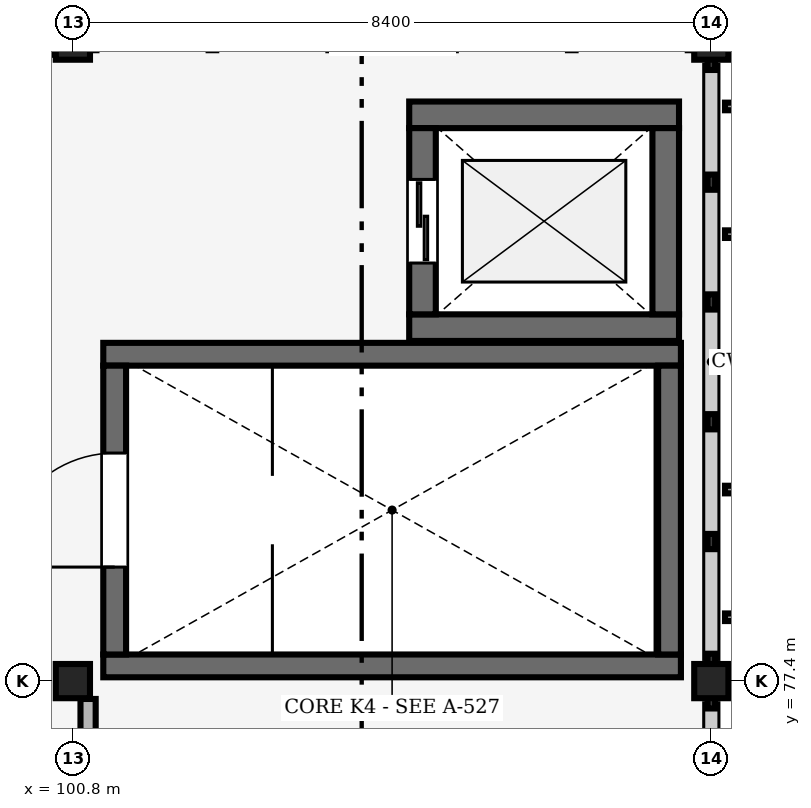
"""IFC4 building model, lengths in metres.
Left out: names, types, materials, properties, quantities, classifications, styles, units other than length and angle.
Written with IfcOpenShell. Run it as: python <this file> out.ifc"""

import sys

from ifc_helpers import new_model, si_unit, direction, frame, frame_2d, origin, origin_2d, place, context, subcontext, project, spatial, rectangle, extrude, element, fill, save


model = new_model("IFC4")
c1 = context("Model", 3, precision=1e-05, world=origin(), true_north=direction((0.0, 1.0)))
c2 = subcontext(c1, "Body", "Model", "MODEL_VIEW")
j1 = project(units=[si_unit("LENGTHUNIT", "METRE"), si_unit("PLANEANGLEUNIT", "RADIAN")], contexts=[c1])
p1 = place(None, origin())
s1 = spatial("IfcSite", under=j1, at=p1, CompositionType="ELEMENT")
p2 = place(p1, origin())
s2 = spatial("IfcBuilding", under=s1, at=p2, CompositionType="ELEMENT")
p3 = place(p2, frame((0.0, 0.0, 17.4)))
s3 = spatial("IfcBuildingStorey", under=s2, at=p3, CompositionType="ELEMENT", Elevation=17.4)
for number, where, z_axis, x_axis in (
    (1, (100.8, 77.4, 0.0), (0.0, 0.0, 1.0), (1.0, 0.0, 0.0)),
    (2, (100.8, 85.8, 0.0), (0.0, 0.0, 1.0), (1.0, 0.0, 0.0)),
    (3, (109.2, 77.4, 0.0), (0.0, 0.0, 1.0), (1.0, 0.0, 0.0)),
    (4, (109.2, 85.8, 0.0), (0.0, 0.0, 1.0), (1.0, 0.0, 0.0)),
):
    element("IfcColumn", number, at=place(p3, frame(where, z_axis=z_axis, x_axis=x_axis)), inside=s3, PredefinedType="COLUMN", context=c2, shape_type="SweptSolid", body=[
        extrude(rectangle(XDim=0.45, YDim=0.45, at=origin_2d()), origin(), (0.0, 0.0, 1.0), 4.2),
    ])
p4 = place(p3, frame((92.6, 85.8, 0.0), z_axis=(0.0, 0.0, 1.0), x_axis=(1.0, 0.0, 0.0)))
e5 = element("IfcWall", 5, at=p4, inside=s3, PredefinedType="SOLIDWALL", context=c2, shape_type="SweptSolid", body=[
    extrude(rectangle(XDim=8.0, YDim=0.32, at=frame_2d((4.0, 0.0))), origin(), (0.0, 0.0, 1.0), 3.48),
])
p5 = place(p4, frame((0.45, 0.0, 0.9)))
e6 = element("IfcOpeningElement", 6, at=p5, cuts=e5, PredefinedType="OPENING", context=c2, shape_type="SweptSolid", body=[
    extrude(rectangle(XDim=1.2, YDim=1.8, at=frame_2d((0.6, 0.9))), frame((0.0, 0.17, 0.0), z_axis=(0.0, -1.0, 0.0), x_axis=(1.0, 0.0, 0.0)), (0.0, 0.0, 1.0), 0.34),
])
p6 = place(p4, frame((6.07, 0.0, 0.9)))
e7 = element("IfcOpeningElement", 7, at=p6, cuts=e5, PredefinedType="OPENING", context=c2, shape_type="SweptSolid", body=[
    extrude(rectangle(XDim=1.68, YDim=2.4, at=frame_2d((0.84, 1.2))), frame((0.0, 0.17, 0.0), z_axis=(0.0, -1.0, 0.0), x_axis=(1.0, 0.0, 0.0)), (0.0, 0.0, 1.0), 0.34),
])
for number, where, z_axis, x_axis in (
    (8, (101.2, 77.6, 0.0), (0.0, 0.0, 1.0), (1.0, 0.0, 0.0)),
    (9, (101.2, 81.7, 0.0), (0.0, 0.0, 1.0), (1.0, 0.0, 0.0)),
):
    element("IfcWall", number, at=place(p3, frame(where, z_axis=z_axis, x_axis=x_axis)), inside=s3, PredefinedType="SHEAR", context=c2, shape_type="SweptSolid", body=[
        extrude(rectangle(XDim=7.6, YDim=0.3, at=frame_2d((3.8, 0.0))), origin(), (0.0, 0.0, 1.0), 4.025),
    ])
p7 = place(p3, frame((101.35, 77.75, 0.0), z_axis=(0.0, 0.0, 1.0), x_axis=(0.0, 1.0, 0.0)))
e10 = element("IfcWall", 10, at=p7, inside=s3, PredefinedType="SHEAR", context=c2, shape_type="SweptSolid", body=[
    extrude(rectangle(XDim=3.8, YDim=0.3, at=frame_2d((1.9, 0.0))), origin(), (0.0, 0.0, 1.0), 4.025),
])
p8 = place(p7, frame((1.15, 0.0, 0.0)))
e11 = element("IfcOpeningElement", 11, at=p8, cuts=e10, PredefinedType="OPENING", context=c2, shape_type="SweptSolid", body=[
    extrude(rectangle(XDim=1.5, YDim=2.2, at=frame_2d((0.75, 1.1))), frame((0.0, 0.16, 0.0), z_axis=(0.0, -1.0, 0.0), x_axis=(1.0, 0.0, 0.0)), (0.0, 0.0, 1.0), 0.32),
])
p9 = place(p3, frame((108.65, 77.75, 0.0), z_axis=(0.0, 0.0, 1.0), x_axis=(0.0, 1.0, 0.0)))
e12 = element("IfcWall", 12, at=p9, inside=s3, PredefinedType="SHEAR", context=c2, shape_type="SweptSolid", body=[
    extrude(rectangle(XDim=3.8, YDim=0.3, at=frame_2d((1.9, 0.0))), origin(), (0.0, 0.0, 1.0), 4.025),
])
for number, where, z_axis, x_axis in (
    (13, (105.225, 82.05, 0.0), (0.0, 0.0, 1.0), (1.0, 0.0, 0.0)),
    (14, (105.225, 84.85, 0.0), (0.0, 0.0, 1.0), (1.0, 0.0, 0.0)),
):
    element("IfcWall", number, at=place(p3, frame(where, z_axis=z_axis, x_axis=x_axis)), inside=s3, PredefinedType="SHEAR", context=c2, shape_type="SweptSolid", body=[
        extrude(rectangle(XDim=3.55, YDim=0.35, at=frame_2d((1.775, 0.0))), origin(), (0.0, 0.0, 1.0), 3.92),
    ])
p10 = place(p3, frame((105.4, 82.225, 0.0), z_axis=(0.0, 0.0, 1.0), x_axis=(0.0, 1.0, 0.0)))
e15 = element("IfcWall", 15, at=p10, inside=s3, PredefinedType="SHEAR", context=c2, shape_type="SweptSolid", body=[
    extrude(rectangle(XDim=2.45, YDim=0.35, at=frame_2d((1.225, 0.0))), origin(), (0.0, 0.0, 1.0), 3.92),
])
p11 = place(p10, frame((0.675, 0.0, 0.0)))
e16 = element("IfcOpeningElement", 16, at=p11, cuts=e15, PredefinedType="OPENING", context=c2, shape_type="SweptSolid", body=[
    extrude(rectangle(XDim=1.1, YDim=2.2, at=frame_2d((0.55, 1.1))), frame((0.0, 0.185, 0.0), z_axis=(0.0, -1.0, 0.0), x_axis=(1.0, 0.0, 0.0)), (0.0, 0.0, 1.0), 0.37),
])
p12 = place(p3, frame((108.6, 82.225, 0.0), z_axis=(0.0, 0.0, 1.0), x_axis=(0.0, 1.0, 0.0)))
e17 = element("IfcWall", 17, at=p12, inside=s3, PredefinedType="SHEAR", context=c2, shape_type="SweptSolid", body=[
    extrude(rectangle(XDim=2.45, YDim=0.35, at=frame_2d((1.225, 0.0))), origin(), (0.0, 0.0, 1.0), 3.92),
])
p13 = place(p3, frame((101.0, 69.235, 0.0), z_axis=(0.0, 0.0, 1.0), x_axis=(0.0, 1.0, 0.0)))
e18 = element("IfcWall", 18, at=p13, inside=s3, PredefinedType="PARTITIONING", context=c2, shape_type="SweptSolid", body=[
    extrude(rectangle(XDim=7.93, YDim=0.2, at=frame_2d((3.965, 0.0))), origin(), (0.0, 0.0, 1.0), 3.48),
])
p14 = place(p13, frame((1.465, 0.0, 0.0)))
e19 = element("IfcOpeningElement", 19, at=p14, cuts=e18, PredefinedType="OPENING", context=c2, shape_type="SweptSolid", body=[
    extrude(rectangle(XDim=0.9, YDim=2.1, at=frame_2d((0.45, 1.05))), frame((0.0, 0.11, 0.0), z_axis=(0.0, -1.0, 0.0), x_axis=(1.0, 0.0, 0.0)), (0.0, 0.0, 1.0), 0.22),
])
p15 = place(p13, frame((5.04, 0.0, 0.0)))
e20 = element("IfcOpeningElement", 20, at=p15, cuts=e18, PredefinedType="OPENING", context=c2, shape_type="SweptSolid", body=[
    extrude(rectangle(XDim=1.05, YDim=2.2, at=frame_2d((0.525, 1.1))), frame((0.0, 0.11, 0.0), z_axis=(0.0, -1.0, 0.0), x_axis=(1.0, 0.0, 0.0)), (0.0, 0.0, 1.0), 0.22),
])
p16 = place(p8, origin())
e21 = element("IfcDoor", 21, at=p16, inside=s3, OperationType="DOUBLE_DOOR_SINGLE_SWING", PredefinedType="DOOR", context=c2, shape_type="SweptSolid", body=[
    extrude(rectangle(XDim=1.5, YDim=2.2, at=frame_2d((0.75, 1.1))), frame((0.0, 0.025, 0.0), z_axis=(0.0, -1.0, 0.0), x_axis=(1.0, 0.0, 0.0)), (0.0, 0.0, 1.0), 0.05),
])
fill(e11, e21)
p17 = place(p11, origin())
e22 = element("IfcDoor", 22, at=p17, inside=s3, OperationType="DOUBLE_DOOR_SLIDING", PredefinedType="DOOR", context=c2, shape_type="SweptSolid", body=[
    extrude(rectangle(XDim=1.1, YDim=2.2, at=frame_2d((0.55, 1.1))), frame((0.0, 0.025, 0.0), z_axis=(0.0, -1.0, 0.0), x_axis=(1.0, 0.0, 0.0)), (0.0, 0.0, 1.0), 0.05),
])
fill(e16, e22)
save(model, sys.argv[1])
